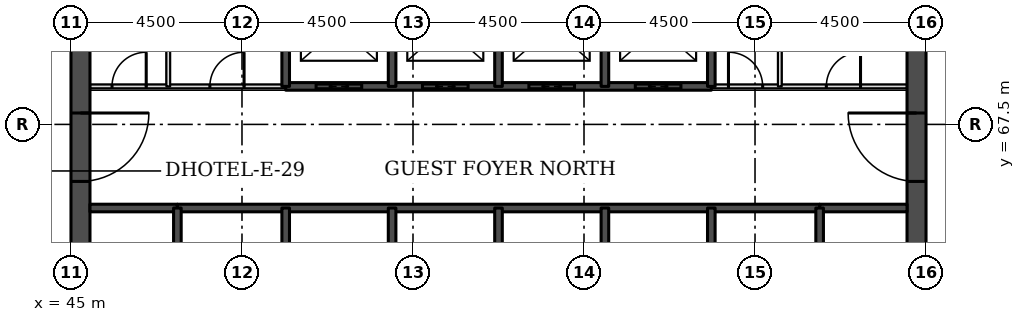
"""IFC4 building model, lengths in metres.
Left out: names, types, materials, properties, quantities, classifications, styles, units other than length and angle.
Written with IfcOpenShell. Run it as: python <this file> out.ifc"""

import sys

from ifc_helpers import new_model, si_unit, direction, frame, frame_2d, origin, place, context, subcontext, project, spatial, rectangle, extrude, element, fill, save


model = new_model("IFC4")
c1 = context("Model", 3, precision=1e-05, world=origin(), true_north=direction((0.0, 1.0)))
c2 = subcontext(c1, "Body", "Model", "MODEL_VIEW")
j1 = project(units=[si_unit("LENGTHUNIT", "METRE"), si_unit("PLANEANGLEUNIT", "RADIAN")], contexts=[c1])
p1 = place(None, origin())
s1 = spatial("IfcSite", under=j1, at=p1, CompositionType="ELEMENT")
p2 = place(p1, origin())
s2 = spatial("IfcBuilding", under=s1, at=p2, CompositionType="ELEMENT")
p3 = place(p2, frame((0.0, 0.0, 39.6)))
s3 = spatial("IfcBuildingStorey", under=s2, at=p3, CompositionType="ELEMENT", Elevation=39.6)
p4 = place(p3, frame((45.25, 49.5, 0.0), z_axis=(0.0, 0.0, 1.0), x_axis=(0.0, 1.0, 0.0)))
e1 = element("IfcWall", 1, at=p4, inside=s3, PredefinedType="SHEAR", context=c2, shape_type="SweptSolid", body=[
    extrude(rectangle(XDim=22.5, YDim=0.5, at=frame_2d((11.25, 0.0))), origin(), (0.0, 0.0, 1.0), 3.3),
])
p5 = place(p4, frame((4.2, 0.0, 0.0)))
e2 = element("IfcOpeningElement", 2, at=p5, cuts=e1, PredefinedType="OPENING", context=c2, shape_type="SweptSolid", body=[
    extrude(rectangle(XDim=1.8, YDim=2.1, at=frame_2d((0.9, 1.05))), frame((0.0, 0.26, 0.0), z_axis=(0.0, -1.0, 0.0), x_axis=(1.0, 0.0, 0.0)), (0.0, 0.0, 1.0), 0.52),
])
p6 = place(p4, frame((6.9, 0.0, 0.0)))
e3 = element("IfcOpeningElement", 3, at=p6, cuts=e1, PredefinedType="OPENING", context=c2, shape_type="SweptSolid", body=[
    extrude(rectangle(XDim=1.1, YDim=2.1, at=frame_2d((0.55, 1.05))), frame((0.0, 0.26, 0.0), z_axis=(0.0, -1.0, 0.0), x_axis=(1.0, 0.0, 0.0)), (0.0, 0.0, 1.0), 0.52),
])
p7 = place(p4, frame((13.6, 0.0, 0.0)))
e4 = element("IfcOpeningElement", 4, at=p7, cuts=e1, PredefinedType="OPENING", context=c2, shape_type="SweptSolid", body=[
    extrude(rectangle(XDim=1.1, YDim=2.1, at=frame_2d((0.55, 1.05))), frame((0.0, 0.26, 0.0), z_axis=(0.0, -1.0, 0.0), x_axis=(1.0, 0.0, 0.0)), (0.0, 0.0, 1.0), 0.52),
])
p8 = place(p4, frame((16.5, 0.0, 0.0)))
e5 = element("IfcOpeningElement", 5, at=p8, cuts=e1, PredefinedType="OPENING", context=c2, shape_type="SweptSolid", body=[
    extrude(rectangle(XDim=1.8, YDim=2.1, at=frame_2d((0.9, 1.05))), frame((0.0, 0.26, 0.0), z_axis=(0.0, -1.0, 0.0), x_axis=(1.0, 0.0, 0.0)), (0.0, 0.0, 1.0), 0.52),
])
p9 = place(p3, frame((67.25, 49.5, 0.0), z_axis=(0.0, 0.0, 1.0), x_axis=(0.0, 1.0, 0.0)))
e6 = element("IfcWall", 6, at=p9, inside=s3, PredefinedType="SHEAR", context=c2, shape_type="SweptSolid", body=[
    extrude(rectangle(XDim=22.5, YDim=0.5, at=frame_2d((11.25, 0.0))), origin(), (0.0, 0.0, 1.0), 3.3),
])
p10 = place(p9, frame((4.2, 0.0, 0.0)))
e7 = element("IfcOpeningElement", 7, at=p10, cuts=e6, PredefinedType="OPENING", context=c2, shape_type="SweptSolid", body=[
    extrude(rectangle(XDim=1.8, YDim=2.1, at=frame_2d((0.9, 1.05))), frame((0.0, 0.26, 0.0), z_axis=(0.0, -1.0, 0.0), x_axis=(1.0, 0.0, 0.0)), (0.0, 0.0, 1.0), 0.52),
])
p11 = place(p9, frame((6.9, 0.0, 0.0)))
e8 = element("IfcOpeningElement", 8, at=p11, cuts=e6, PredefinedType="OPENING", context=c2, shape_type="SweptSolid", body=[
    extrude(rectangle(XDim=1.1, YDim=2.1, at=frame_2d((0.55, 1.05))), frame((0.0, 0.26, 0.0), z_axis=(0.0, -1.0, 0.0), x_axis=(1.0, 0.0, 0.0)), (0.0, 0.0, 1.0), 0.52),
])
p12 = place(p9, frame((13.6, 0.0, 0.0)))
e9 = element("IfcOpeningElement", 9, at=p12, cuts=e6, PredefinedType="OPENING", context=c2, shape_type="SweptSolid", body=[
    extrude(rectangle(XDim=1.1, YDim=2.1, at=frame_2d((0.55, 1.05))), frame((0.0, 0.26, 0.0), z_axis=(0.0, -1.0, 0.0), x_axis=(1.0, 0.0, 0.0)), (0.0, 0.0, 1.0), 0.52),
])
p13 = place(p9, frame((16.5, 0.0, 0.0)))
e10 = element("IfcOpeningElement", 10, at=p13, cuts=e6, PredefinedType="OPENING", context=c2, shape_type="SweptSolid", body=[
    extrude(rectangle(XDim=1.8, YDim=2.1, at=frame_2d((0.9, 1.05))), frame((0.0, 0.26, 0.0), z_axis=(0.0, -1.0, 0.0), x_axis=(1.0, 0.0, 0.0)), (0.0, 0.0, 1.0), 0.52),
])
for number, where, z_axis, x_axis in (
    (11, (45.5, 65.3, 0.0), (0.0, 0.0, 1.0), (1.0, 0.0, 0.0)),
    (12, (64.7, 65.3, 0.0), (0.0, 0.0, 1.0), (1.0, 0.0, 0.0)),
):
    element("IfcWall", number, at=place(p3, frame(where, z_axis=z_axis, x_axis=x_axis)), inside=s3, PredefinedType="SOLIDWALL", context=c2, shape_type="SweptSolid", body=[
        extrude(rectangle(XDim=2.3, YDim=0.2, at=frame_2d((1.15, 0.0))), origin(), (0.0, 0.0, 1.0), 3.08),
    ])
p14 = place(p3, frame((47.8, 65.3, 0.0), z_axis=(0.0, 0.0, 1.0), x_axis=(1.0, 0.0, 0.0)))
e13 = element("IfcWall", 13, at=p14, inside=s3, PredefinedType="SOLIDWALL", context=c2, shape_type="SweptSolid", body=[
    extrude(rectangle(XDim=16.9, YDim=0.2, at=frame_2d((8.45, 0.0))), origin(), (0.0, 0.0, 1.0), 3.08),
])
p15 = place(p3, frame((45.5, 68.5, 0.0), z_axis=(0.0, 0.0, 1.0), x_axis=(1.0, 0.0, 0.0)))
e14 = element("IfcWall", 14, at=p15, inside=s3, PredefinedType="PARTITIONING", context=c2, shape_type="SweptSolid", body=[
    extrude(rectangle(XDim=5.15, YDim=0.1, at=frame_2d((2.575, 0.0))), origin(), (0.0, 0.0, 1.0), 3.08),
])
p16 = place(p15, frame((0.58, 0.0, 0.0)))
e15 = element("IfcOpeningElement", 15, at=p16, cuts=e14, PredefinedType="OPENING", context=c2, shape_type="SweptSolid", body=[
    extrude(rectangle(XDim=0.9, YDim=2.1, at=frame_2d((0.45, 1.05))), frame((0.0, 0.06, 0.0), z_axis=(0.0, -1.0, 0.0), x_axis=(1.0, 0.0, 0.0)), (0.0, 0.0, 1.0), 0.12),
])
p17 = place(p15, frame((3.155, 0.0, 0.0)))
e16 = element("IfcOpeningElement", 16, at=p17, cuts=e14, PredefinedType="OPENING", context=c2, shape_type="SweptSolid", body=[
    extrude(rectangle(XDim=0.9, YDim=2.1, at=frame_2d((0.45, 1.05))), frame((0.0, 0.06, 0.0), z_axis=(0.0, -1.0, 0.0), x_axis=(1.0, 0.0, 0.0)), (0.0, 0.0, 1.0), 0.12),
])
p18 = place(p3, frame((61.85, 68.5, 0.0), z_axis=(0.0, 0.0, 1.0), x_axis=(1.0, 0.0, 0.0)))
e17 = element("IfcWall", 17, at=p18, inside=s3, PredefinedType="PARTITIONING", context=c2, shape_type="SweptSolid", body=[
    extrude(rectangle(XDim=5.15, YDim=0.1, at=frame_2d((2.575, 0.0))), origin(), (0.0, 0.0, 1.0), 3.08),
])
p19 = place(p18, frame((3.026, 0.0, 0.0)))
e18 = element("IfcOpeningElement", 18, at=p19, cuts=e17, PredefinedType="OPENING", context=c2, shape_type="SweptSolid", body=[
    extrude(rectangle(XDim=0.9, YDim=2.1, at=frame_2d((0.45, 1.05))), frame((0.0, 0.06, 0.0), z_axis=(0.0, -1.0, 0.0), x_axis=(1.0, 0.0, 0.0)), (0.0, 0.0, 1.0), 0.12),
])
p20 = place(p18, frame((0.451, 0.0, 0.0)))
e19 = element("IfcOpeningElement", 19, at=p20, cuts=e17, PredefinedType="OPENING", context=c2, shape_type="SweptSolid", body=[
    extrude(rectangle(XDim=0.9, YDim=2.1, at=frame_2d((0.45, 1.05))), frame((0.0, 0.06, 0.0), z_axis=(0.0, -1.0, 0.0), x_axis=(1.0, 0.0, 0.0)), (0.0, 0.0, 1.0), 0.12),
])
p21 = place(p3, frame((50.65, 68.5, 0.0), z_axis=(0.0, 0.0, 1.0), x_axis=(1.0, 0.0, 0.0)))
e20 = element("IfcWall", 20, at=p21, inside=s3, PredefinedType="SOLIDWALL", context=c2, shape_type="SweptSolid", body=[
    extrude(rectangle(XDim=11.2, YDim=0.2, at=frame_2d((5.6, 0.0))), origin(), (0.0, 0.0, 1.0), 3.08),
])
p22 = place(p21, frame((0.8, 0.0, 0.0)))
e21 = element("IfcOpeningElement", 21, at=p22, cuts=e20, PredefinedType="OPENING", context=c2, shape_type="SweptSolid", body=[
    extrude(rectangle(XDim=1.2, YDim=2.1, at=frame_2d((0.6, 1.05))), frame((0.0, 0.11, 0.0), z_axis=(0.0, -1.0, 0.0), x_axis=(1.0, 0.0, 0.0)), (0.0, 0.0, 1.0), 0.22),
])
p23 = place(p21, frame((3.6, 0.0, 0.0)))
e22 = element("IfcOpeningElement", 22, at=p23, cuts=e20, PredefinedType="OPENING", context=c2, shape_type="SweptSolid", body=[
    extrude(rectangle(XDim=1.2, YDim=2.1, at=frame_2d((0.6, 1.05))), frame((0.0, 0.11, 0.0), z_axis=(0.0, -1.0, 0.0), x_axis=(1.0, 0.0, 0.0)), (0.0, 0.0, 1.0), 0.22),
])
p24 = place(p21, frame((6.4, 0.0, 0.0)))
e23 = element("IfcOpeningElement", 23, at=p24, cuts=e20, PredefinedType="OPENING", context=c2, shape_type="SweptSolid", body=[
    extrude(rectangle(XDim=1.2, YDim=2.1, at=frame_2d((0.6, 1.05))), frame((0.0, 0.11, 0.0), z_axis=(0.0, -1.0, 0.0), x_axis=(1.0, 0.0, 0.0)), (0.0, 0.0, 1.0), 0.22),
])
p25 = place(p21, frame((9.2, 0.0, 0.0)))
e24 = element("IfcOpeningElement", 24, at=p25, cuts=e20, PredefinedType="OPENING", context=c2, shape_type="SweptSolid", body=[
    extrude(rectangle(XDim=1.2, YDim=2.1, at=frame_2d((0.6, 1.05))), frame((0.0, 0.11, 0.0), z_axis=(0.0, -1.0, 0.0), x_axis=(1.0, 0.0, 0.0)), (0.0, 0.0, 1.0), 0.22),
])
p26 = place(p3, frame((47.56, 68.5, 0.0), z_axis=(0.0, 0.0, 1.0), x_axis=(0.0, 1.0, 0.0)))
e25 = element("IfcWall", 25, at=p26, inside=s3, PredefinedType="PARTITIONING", context=c2, shape_type="SweptSolid", body=[
    extrude(rectangle(XDim=3.0, YDim=0.1, at=frame_2d((1.5, 0.0))), origin(), (0.0, 0.0, 1.0), 3.08),
])
p27 = place(p3, frame((47.8, 62.0, 0.0), z_axis=(0.0, 0.0, 1.0), x_axis=(0.0, 1.0, 0.0)))
e26 = element("IfcWall", 26, at=p27, inside=s3, PredefinedType="SOLIDWALL", context=c2, shape_type="SweptSolid", body=[
    extrude(rectangle(XDim=3.3, YDim=0.2, at=frame_2d((1.65, 0.0))), origin(), (0.0, 0.0, 1.0), 3.08),
])
p28 = place(p27, frame((1.1, 0.0, 0.0)))
e27 = element("IfcOpeningElement", 27, at=p28, cuts=e26, PredefinedType="OPENING", context=c2, shape_type="SweptSolid", body=[
    extrude(rectangle(XDim=1.1, YDim=2.1, at=frame_2d((0.55, 1.05))), frame((0.0, 0.11, 0.0), z_axis=(0.0, -1.0, 0.0), x_axis=(1.0, 0.0, 0.0)), (0.0, 0.0, 1.0), 0.22),
])
p29 = place(p3, frame((50.65, 62.0, 0.0), z_axis=(0.0, 0.0, 1.0), x_axis=(0.0, 1.0, 0.0)))
e28 = element("IfcWall", 28, at=p29, inside=s3, PredefinedType="SOLIDWALL", context=c2, shape_type="SweptSolid", body=[
    extrude(rectangle(XDim=3.3, YDim=0.2, at=frame_2d((1.65, 0.0))), origin(), (0.0, 0.0, 1.0), 3.08),
])
p30 = place(p3, frame((50.65, 68.5, 0.0), z_axis=(0.0, 0.0, 1.0), x_axis=(0.0, 1.0, 0.0)))
e29 = element("IfcWall", 29, at=p30, inside=s3, PredefinedType="SOLIDWALL", context=c2, shape_type="SweptSolid", body=[
    extrude(rectangle(XDim=3.0, YDim=0.2, at=frame_2d((1.5, 0.0))), origin(), (0.0, 0.0, 1.0), 3.08),
])
p31 = place(p3, frame((53.45, 62.5, 0.0), z_axis=(0.0, 0.0, 1.0), x_axis=(0.0, 1.0, 0.0)))
e30 = element("IfcWall", 30, at=p31, inside=s3, PredefinedType="SOLIDWALL", context=c2, shape_type="SweptSolid", body=[
    extrude(rectangle(XDim=2.8, YDim=0.2, at=frame_2d((1.4, 0.0))), origin(), (0.0, 0.0, 1.0), 3.08),
])
p32 = place(p3, frame((53.45, 68.5, 0.0), z_axis=(0.0, 0.0, 1.0), x_axis=(0.0, 1.0, 0.0)))
e31 = element("IfcWall", 31, at=p32, inside=s3, PredefinedType="SOLIDWALL", context=c2, shape_type="SweptSolid", body=[
    extrude(rectangle(XDim=3.0, YDim=0.2, at=frame_2d((1.5, 0.0))), origin(), (0.0, 0.0, 1.0), 3.08),
])
p33 = place(p3, frame((56.25, 62.5, 0.0), z_axis=(0.0, 0.0, 1.0), x_axis=(0.0, 1.0, 0.0)))
e32 = element("IfcWall", 32, at=p33, inside=s3, PredefinedType="SOLIDWALL", context=c2, shape_type="SweptSolid", body=[
    extrude(rectangle(XDim=2.8, YDim=0.2, at=frame_2d((1.4, 0.0))), origin(), (0.0, 0.0, 1.0), 3.08),
])
p34 = place(p3, frame((56.25, 68.5, 0.0), z_axis=(0.0, 0.0, 1.0), x_axis=(0.0, 1.0, 0.0)))
e33 = element("IfcWall", 33, at=p34, inside=s3, PredefinedType="SOLIDWALL", context=c2, shape_type="SweptSolid", body=[
    extrude(rectangle(XDim=3.0, YDim=0.2, at=frame_2d((1.5, 0.0))), origin(), (0.0, 0.0, 1.0), 3.08),
])
p35 = place(p3, frame((59.05, 62.5, 0.0), z_axis=(0.0, 0.0, 1.0), x_axis=(0.0, 1.0, 0.0)))
e34 = element("IfcWall", 34, at=p35, inside=s3, PredefinedType="SOLIDWALL", context=c2, shape_type="SweptSolid", body=[
    extrude(rectangle(XDim=2.8, YDim=0.2, at=frame_2d((1.4, 0.0))), origin(), (0.0, 0.0, 1.0), 3.08),
])
p36 = place(p3, frame((59.05, 68.5, 0.0), z_axis=(0.0, 0.0, 1.0), x_axis=(0.0, 1.0, 0.0)))
e35 = element("IfcWall", 35, at=p36, inside=s3, PredefinedType="SOLIDWALL", context=c2, shape_type="SweptSolid", body=[
    extrude(rectangle(XDim=3.0, YDim=0.2, at=frame_2d((1.5, 0.0))), origin(), (0.0, 0.0, 1.0), 3.08),
])
p37 = place(p3, frame((61.85, 62.0, 0.0), z_axis=(0.0, 0.0, 1.0), x_axis=(0.0, 1.0, 0.0)))
e36 = element("IfcWall", 36, at=p37, inside=s3, PredefinedType="SOLIDWALL", context=c2, shape_type="SweptSolid", body=[
    extrude(rectangle(XDim=3.3, YDim=0.2, at=frame_2d((1.65, 0.0))), origin(), (0.0, 0.0, 1.0), 3.08),
])
p38 = place(p3, frame((61.85, 68.5, 0.0), z_axis=(0.0, 0.0, 1.0), x_axis=(0.0, 1.0, 0.0)))
e37 = element("IfcWall", 37, at=p38, inside=s3, PredefinedType="SOLIDWALL", context=c2, shape_type="SweptSolid", body=[
    extrude(rectangle(XDim=3.0, YDim=0.2, at=frame_2d((1.5, 0.0))), origin(), (0.0, 0.0, 1.0), 3.08),
])
p39 = place(p3, frame((63.653, 68.5, 0.0), z_axis=(0.0, 0.0, 1.0), x_axis=(0.0, 1.0, 0.0)))
e38 = element("IfcWall", 38, at=p39, inside=s3, PredefinedType="PARTITIONING", context=c2, shape_type="SweptSolid", body=[
    extrude(rectangle(XDim=3.0, YDim=0.1, at=frame_2d((1.5, 0.0))), origin(), (0.0, 0.0, 1.0), 3.08),
])
p40 = place(p3, frame((64.7, 62.0, 0.0), z_axis=(0.0, 0.0, 1.0), x_axis=(0.0, 1.0, 0.0)))
e39 = element("IfcWall", 39, at=p40, inside=s3, PredefinedType="SOLIDWALL", context=c2, shape_type="SweptSolid", body=[
    extrude(rectangle(XDim=3.3, YDim=0.2, at=frame_2d((1.65, 0.0))), origin(), (0.0, 0.0, 1.0), 3.08),
])
p41 = place(p40, frame((1.1, 0.0, 0.0)))
e40 = element("IfcOpeningElement", 40, at=p41, cuts=e39, PredefinedType="OPENING", context=c2, shape_type="SweptSolid", body=[
    extrude(rectangle(XDim=1.1, YDim=2.1, at=frame_2d((0.55, 1.05))), frame((0.0, 0.11, 0.0), z_axis=(0.0, -1.0, 0.0), x_axis=(1.0, 0.0, 0.0)), (0.0, 0.0, 1.0), 0.22),
])
p42 = place(p22, origin())
e41 = element("IfcDoor", 41, at=p42, inside=s3, OperationType="DOUBLE_DOOR_SLIDING", PredefinedType="DOOR", context=c2, shape_type="SweptSolid", body=[
    extrude(rectangle(XDim=1.2, YDim=2.1, at=frame_2d((0.6, 1.05))), frame((0.0, 0.025, 0.0), z_axis=(0.0, -1.0, 0.0), x_axis=(1.0, 0.0, 0.0)), (0.0, 0.0, 1.0), 0.05),
])
fill(e21, e41)
p43 = place(p23, origin())
e42 = element("IfcDoor", 42, at=p43, inside=s3, OperationType="DOUBLE_DOOR_SLIDING", PredefinedType="DOOR", context=c2, shape_type="SweptSolid", body=[
    extrude(rectangle(XDim=1.2, YDim=2.1, at=frame_2d((0.6, 1.05))), frame((0.0, 0.025, 0.0), z_axis=(0.0, -1.0, 0.0), x_axis=(1.0, 0.0, 0.0)), (0.0, 0.0, 1.0), 0.05),
])
fill(e22, e42)
p44 = place(p24, origin())
e43 = element("IfcDoor", 43, at=p44, inside=s3, OperationType="DOUBLE_DOOR_SLIDING", PredefinedType="DOOR", context=c2, shape_type="SweptSolid", body=[
    extrude(rectangle(XDim=1.2, YDim=2.1, at=frame_2d((0.6, 1.05))), frame((0.0, 0.025, 0.0), z_axis=(0.0, -1.0, 0.0), x_axis=(1.0, 0.0, 0.0)), (0.0, 0.0, 1.0), 0.05),
])
fill(e23, e43)
p45 = place(p25, origin())
e44 = element("IfcDoor", 44, at=p45, inside=s3, OperationType="DOUBLE_DOOR_SLIDING", PredefinedType="DOOR", context=c2, shape_type="SweptSolid", body=[
    extrude(rectangle(XDim=1.2, YDim=2.1, at=frame_2d((0.6, 1.05))), frame((0.0, 0.025, 0.0), z_axis=(0.0, -1.0, 0.0), x_axis=(1.0, 0.0, 0.0)), (0.0, 0.0, 1.0), 0.05),
])
fill(e24, e44)
p46 = place(p8, frame((1.8, 0.0, 0.0), z_axis=(0.0, 0.0, 1.0), x_axis=(-1.0, 0.0, 0.0)))
e45 = element("IfcDoor", 45, at=p46, inside=s3, OperationType="SINGLE_SWING_LEFT", PredefinedType="DOOR", context=c2, shape_type="SweptSolid", body=[
    extrude(rectangle(XDim=1.8, YDim=2.1, at=frame_2d((0.9, 1.05))), frame((0.0, 0.025, 0.0), z_axis=(0.0, -1.0, 0.0), x_axis=(1.0, 0.0, 0.0)), (0.0, 0.0, 1.0), 0.05),
])
fill(e5, e45)
p47 = place(p13, origin())
e46 = element("IfcDoor", 46, at=p47, inside=s3, OperationType="SINGLE_SWING_RIGHT", PredefinedType="DOOR", context=c2, shape_type="SweptSolid", body=[
    extrude(rectangle(XDim=1.8, YDim=2.1, at=frame_2d((0.9, 1.05))), frame((0.0, 0.025, 0.0), z_axis=(0.0, -1.0, 0.0), x_axis=(1.0, 0.0, 0.0)), (0.0, 0.0, 1.0), 0.05),
])
fill(e10, e46)
p48 = place(p19, origin())
e47 = element("IfcDoor", 47, at=p48, inside=s3, OperationType="SINGLE_SWING_RIGHT", PredefinedType="DOOR", context=c2, shape_type="SweptSolid", body=[
    extrude(rectangle(XDim=0.9, YDim=2.1, at=frame_2d((0.45, 1.05))), frame((0.0, 0.025, 0.0), z_axis=(0.0, -1.0, 0.0), x_axis=(1.0, 0.0, 0.0)), (0.0, 0.0, 1.0), 0.05),
])
fill(e18, e47)
p49 = place(p20, origin())
e48 = element("IfcDoor", 48, at=p49, inside=s3, OperationType="SINGLE_SWING_LEFT", PredefinedType="DOOR", context=c2, shape_type="SweptSolid", body=[
    extrude(rectangle(XDim=0.9, YDim=2.1, at=frame_2d((0.45, 1.05))), frame((0.0, 0.025, 0.0), z_axis=(0.0, -1.0, 0.0), x_axis=(1.0, 0.0, 0.0)), (0.0, 0.0, 1.0), 0.05),
])
fill(e19, e48)
p50 = place(p16, origin())
e49 = element("IfcDoor", 49, at=p50, inside=s3, OperationType="SINGLE_SWING_RIGHT", PredefinedType="DOOR", context=c2, shape_type="SweptSolid", body=[
    extrude(rectangle(XDim=0.9, YDim=2.1, at=frame_2d((0.45, 1.05))), frame((0.0, 0.025, 0.0), z_axis=(0.0, -1.0, 0.0), x_axis=(1.0, 0.0, 0.0)), (0.0, 0.0, 1.0), 0.05),
])
fill(e15, e49)
p51 = place(p17, origin())
e50 = element("IfcDoor", 50, at=p51, inside=s3, OperationType="SINGLE_SWING_RIGHT", PredefinedType="DOOR", context=c2, shape_type="SweptSolid", body=[
    extrude(rectangle(XDim=0.9, YDim=2.1, at=frame_2d((0.45, 1.05))), frame((0.0, 0.025, 0.0), z_axis=(0.0, -1.0, 0.0), x_axis=(1.0, 0.0, 0.0)), (0.0, 0.0, 1.0), 0.05),
])
fill(e16, e50)
save(model, sys.argv[1])
